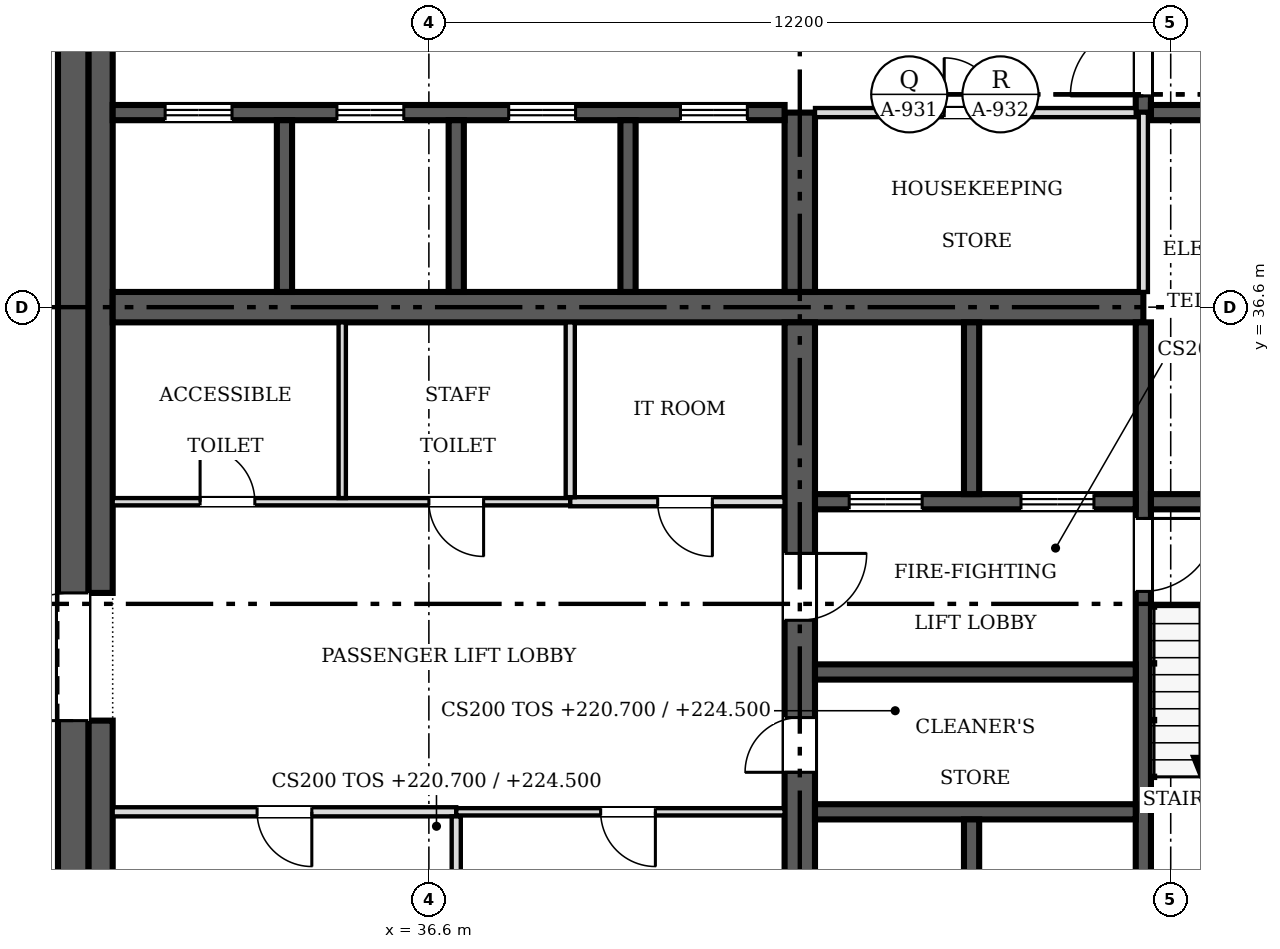
"""IFC4 building model, lengths in metres.
Left out: names, types, materials, properties, quantities, classifications, styles, units other than length and angle.
Written with IfcOpenShell. Run it as: python <this file> out.ifc"""

import sys

from ifc_helpers import new_model, si_unit, direction, frame, frame_2d, origin, place, context, subcontext, project, spatial, rectangle, extrude, source, transform, mapped, element, fill, save


model = new_model("IFC4")
c1 = context("Model", 3, precision=1e-05, world=origin(), true_north=direction((0.0, 1.0)))
c2 = subcontext(c1, "Body", "Model", "MODEL_VIEW")
j1 = project(units=[si_unit("LENGTHUNIT", "METRE"), si_unit("PLANEANGLEUNIT", "RADIAN")], contexts=[c1])
p1 = place(None, origin())
s1 = spatial("IfcSite", under=j1, at=p1, CompositionType="ELEMENT")
p2 = place(p1, origin())
s2 = spatial("IfcBuilding", under=s1, at=p2, CompositionType="ELEMENT")
p3 = place(p2, frame((0.0, 0.0, 220.7)))
s3 = spatial("IfcBuildingStorey", under=s2, at=p3, CompositionType="ELEMENT", Elevation=220.7)
p4 = place(p3, frame((30.75, 24.9, 0.0), z_axis=(0.0, 0.0, 1.0), x_axis=(0.0, 1.0, 0.0)))
e1 = element("IfcWall", 1, at=p4, inside=s3, PredefinedType="SHEAR", context=c2, shape_type="SweptSolid", body=[
    extrude(rectangle(XDim=23.4, YDim=0.5, at=frame_2d((11.7, 0.0))), origin(), (0.0, 0.0, 1.0), 3.8),
])
m1 = source(origin(), c2, "Body", "SweptSolid", [
    extrude(rectangle(XDim=2.1, YDim=2.4, at=frame_2d((1.05, 1.2))), frame((0.0, 0.26, 0.0), z_axis=(0.0, -1.0, 0.0), x_axis=(1.0, 0.0, 0.0)), (0.0, 0.0, 1.0), 0.52),
])
p5 = place(p4, frame((4.9, 0.0, 0.0)))
e2 = element("IfcOpeningElement", 2, at=p5, cuts=e1, PredefinedType="OPENING", context=c2, shape_type="MappedRepresentation", body=[
    mapped(m1, transform((0.0, 0.0, 0.0), scale=1.0)),
])
p6 = place(p4, frame((16.4, 0.0, 0.0)))
e3 = element("IfcOpeningElement", 3, at=p6, cuts=e1, PredefinedType="OPENING", context=c2, shape_type="MappedRepresentation", body=[
    mapped(m1, transform((0.0, 0.0, 0.0), scale=1.0)),
])
p7 = place(p3, frame((31.2, 25.3, 0.0), z_axis=(0.0, 0.0, 1.0), x_axis=(0.0, 1.0, 0.0)))
e4 = element("IfcWall", 4, at=p7, inside=s3, PredefinedType="SOLIDWALL", context=c2, shape_type="SweptSolid", body=[
    extrude(rectangle(XDim=4.5, YDim=0.4, at=frame_2d((2.25, 0.0))), origin(), (0.0, 0.0, 1.0), 3.8),
])
p8 = place(p3, frame((31.2, 31.9, 0.0), z_axis=(0.0, 0.0, 1.0), x_axis=(0.0, 1.0, 0.0)))
e5 = element("IfcWall", 5, at=p8, inside=s3, PredefinedType="SOLIDWALL", context=c2, shape_type="SweptSolid", body=[
    extrude(rectangle(XDim=9.4, YDim=0.4, at=frame_2d((4.7, 0.0))), origin(), (0.0, 0.0, 1.0), 3.8),
])
p9 = place(p3, frame((31.4, 36.6, 0.0), z_axis=(0.0, 0.0, 1.0), x_axis=(1.0, 0.0, 0.0)))
e6 = element("IfcWall", 6, at=p9, inside=s3, PredefinedType="SHEAR", context=c2, shape_type="SweptSolid", body=[
    extrude(rectangle(XDim=16.95, YDim=0.5, at=frame_2d((8.475, 0.0))), origin(), (0.0, 0.0, 1.0), 3.8),
])
p10 = place(p3, frame((42.7, 36.35, 0.0), z_axis=(0.0, 0.0, 1.0), x_axis=(0.0, -1.0, 0.0)))
e7 = element("IfcWall", 7, at=p10, inside=s3, PredefinedType="SHEAR", context=c2, shape_type="SweptSolid", body=[
    extrude(rectangle(XDim=11.05, YDim=0.5, at=frame_2d((5.525, 0.0))), origin(), (0.0, 0.0, 1.0), 3.8),
])
m2 = source(origin(), c2, "Body", "SweptSolid", [
    extrude(rectangle(XDim=0.9, YDim=2.1, at=frame_2d((0.45, 1.05))), frame((0.0, 0.26, 0.0), z_axis=(0.0, -1.0, 0.0), x_axis=(1.0, 0.0, 0.0)), (0.0, 0.0, 1.0), 0.52),
])
p11 = place(p10, frame((6.5, 0.0, 0.0)))
e8 = element("IfcOpeningElement", 8, at=p11, cuts=e7, PredefinedType="OPENING", context=c2, shape_type="MappedRepresentation", body=[
    mapped(m2, transform((0.0, 0.0, 0.0), scale=1.0)),
])
m3 = source(origin(), c2, "Body", "SweptSolid", [
    extrude(rectangle(XDim=1.1, YDim=2.1, at=frame_2d((0.55, 1.05))), frame((0.0, 0.26, 0.0), z_axis=(0.0, -1.0, 0.0), x_axis=(1.0, 0.0, 0.0)), (0.0, 0.0, 1.0), 0.52),
])
p12 = place(p10, frame((3.8, 0.0, 0.0)))
e9 = element("IfcOpeningElement", 9, at=p12, cuts=e7, PredefinedType="OPENING", context=c2, shape_type="MappedRepresentation", body=[
    mapped(m3, transform((0.0, 0.0, 0.0), scale=1.0)),
])
p13 = place(p3, frame((42.7, 36.85, 0.0), z_axis=(0.0, 0.0, 1.0), x_axis=(0.0, 1.0, 0.0)))
e10 = element("IfcWall", 10, at=p13, inside=s3, PredefinedType="SHEAR", context=c2, shape_type="SweptSolid", body=[
    extrude(rectangle(XDim=2.95, YDim=0.5, at=frame_2d((1.475, 0.0))), origin(), (0.0, 0.0, 1.0), 3.8),
])
p14 = place(p3, frame((31.4, 39.8, 0.0), z_axis=(0.0, 0.0, 1.0), x_axis=(1.0, 0.0, 0.0)))
e11 = element("IfcWall", 11, at=p14, inside=s3, PredefinedType="SOLIDWALL", context=c2, shape_type="SweptSolid", body=[
    extrude(rectangle(XDim=11.05, YDim=0.25, at=frame_2d((5.525, 0.0))), origin(), (0.0, 0.0, 1.0), 3.8),
])
m4 = source(origin(), c2, "Body", "SweptSolid", [
    extrude(rectangle(XDim=1.1, YDim=2.1, at=frame_2d((0.55, 1.05))), frame((0.0, 0.135, 0.0), z_axis=(0.0, -1.0, 0.0), x_axis=(1.0, 0.0, 0.0)), (0.0, 0.0, 1.0), 0.27),
])
p15 = place(p14, frame((0.863, 0.0, 0.0)))
e12 = element("IfcOpeningElement", 12, at=p15, cuts=e11, PredefinedType="OPENING", context=c2, shape_type="MappedRepresentation", body=[
    mapped(m4, transform((0.0, 0.0, 0.0), scale=1.0)),
])
p16 = place(p14, frame((3.688, 0.0, 0.0)))
e13 = element("IfcOpeningElement", 13, at=p16, cuts=e11, PredefinedType="OPENING", context=c2, shape_type="MappedRepresentation", body=[
    mapped(m4, transform((0.0, 0.0, 0.0), scale=1.0)),
])
p17 = place(p14, frame((6.512, 0.0, 0.0)))
e14 = element("IfcOpeningElement", 14, at=p17, cuts=e11, PredefinedType="OPENING", context=c2, shape_type="MappedRepresentation", body=[
    mapped(m4, transform((0.0, 0.0, 0.0), scale=1.0)),
])
p18 = place(p14, frame((9.337, 0.0, 0.0)))
e15 = element("IfcOpeningElement", 15, at=p18, cuts=e11, PredefinedType="OPENING", context=c2, shape_type="MappedRepresentation", body=[
    mapped(m4, transform((0.0, 0.0, 0.0), scale=1.0)),
])
p19 = place(p3, frame((48.35, 36.35, 0.0), z_axis=(0.0, 0.0, 1.0), x_axis=(0.0, -1.0, 0.0)))
e16 = element("IfcWall", 16, at=p19, inside=s3, PredefinedType="SOLIDWALL", context=c2, shape_type="SweptSolid", body=[
    extrude(rectangle(XDim=11.05, YDim=0.25, at=frame_2d((5.525, 0.0))), origin(), (0.0, 0.0, 1.0), 3.8),
])
m5 = source(origin(), c2, "Body", "SweptSolid", [
    extrude(rectangle(XDim=1.2, YDim=2.1, at=frame_2d((0.6, 1.05))), frame((0.0, 0.135, 0.0), z_axis=(0.0, -1.0, 0.0), x_axis=(1.0, 0.0, 0.0)), (0.0, 0.0, 1.0), 0.27),
])
p20 = place(p19, frame((3.225, 0.0, 0.0)))
e17 = element("IfcOpeningElement", 17, at=p20, cuts=e16, PredefinedType="OPENING", context=c2, shape_type="MappedRepresentation", body=[
    mapped(m5, transform((0.0, 0.0, 0.0), scale=1.0)),
])
p21 = place(p3, frame((48.225, 33.4, 0.0), z_axis=(0.0, 0.0, 1.0), x_axis=(-1.0, 0.0, 0.0)))
e18 = element("IfcWall", 18, at=p21, inside=s3, PredefinedType="SOLIDWALL", context=c2, shape_type="SweptSolid", body=[
    extrude(rectangle(XDim=5.275, YDim=0.25, at=frame_2d((2.638, 0.0))), origin(), (0.0, 0.0, 1.0), 3.8),
])
p22 = place(p21, frame((3.512, 0.0, 0.0)))
e19 = element("IfcOpeningElement", 19, at=p22, cuts=e18, PredefinedType="OPENING", context=c2, shape_type="MappedRepresentation", body=[
    mapped(m5, transform((0.0, 0.0, 0.0), scale=1.0)),
])
p23 = place(p21, frame((0.688, 0.0, 0.0)))
e20 = element("IfcOpeningElement", 20, at=p23, cuts=e18, PredefinedType="OPENING", context=c2, shape_type="MappedRepresentation", body=[
    mapped(m5, transform((0.0, 0.0, 0.0), scale=1.0)),
])
p24 = place(p3, frame((48.475, 33.4, 0.0), z_axis=(0.0, 0.0, 1.0), x_axis=(1.0, 0.0, 0.0)))
e21 = element("IfcWall", 21, at=p24, inside=s3, PredefinedType="SOLIDWALL", context=c2, shape_type="SweptSolid", body=[
    extrude(rectangle(XDim=3.525, YDim=0.25, at=frame_2d((1.762, 0.0))), origin(), (0.0, 0.0, 1.0), 3.8),
])
p25 = place(p3, frame((48.35, 47.9, 0.0), z_axis=(0.0, 0.0, 1.0), x_axis=(0.0, -1.0, 0.0)))
e22 = element("IfcWall", 22, at=p25, inside=s3, PredefinedType="SOLIDWALL", context=c2, shape_type="SweptSolid", body=[
    extrude(rectangle(XDim=8.1, YDim=0.25, at=frame_2d((4.05, 0.0))), origin(), (0.0, 0.0, 1.0), 3.8),
])
p26 = place(p25, frame((6.625, 0.0, 0.0)))
e23 = element("IfcOpeningElement", 23, at=p26, cuts=e22, PredefinedType="OPENING", context=c2, shape_type="MappedRepresentation", body=[
    mapped(m5, transform((0.0, 0.0, 0.0), scale=1.0)),
])
for number, where, z_axis, x_axis in (
    (24, (42.95, 28.3, 0.0), (0.0, 0.0, 1.0), (1.0, 0.0, 0.0)),
    (25, (42.95, 30.6, 0.0), (0.0, 0.0, 1.0), (1.0, 0.0, 0.0)),
):
    element("IfcWall", number, at=place(p3, frame(where, z_axis=z_axis, x_axis=x_axis)), inside=s3, PredefinedType="SOLIDWALL", context=c2, shape_type="SweptSolid", body=[
        extrude(rectangle(XDim=5.275, YDim=0.25, at=frame_2d((2.638, 0.0))), origin(), (0.0, 0.0, 1.0), 3.8),
    ])
p27 = place(p3, frame((48.475, 39.8, 0.0), z_axis=(0.0, 0.0, 1.0), x_axis=(1.0, 0.0, 0.0)))
e26 = element("IfcWall", 26, at=p27, inside=s3, PredefinedType="SOLIDWALL", context=c2, shape_type="SweptSolid", body=[
    extrude(rectangle(XDim=3.4, YDim=0.25, at=frame_2d((1.7, 0.0))), origin(), (0.0, 0.0, 1.0), 3.8),
])
for number, where, z_axis, x_axis in (
    (27, (34.225, 36.85, 0.0), (0.0, 0.0, 1.0), (0.0, 1.0, 0.0)),
    (28, (37.05, 36.85, 0.0), (0.0, 0.0, 1.0), (0.0, 1.0, 0.0)),
    (29, (39.875, 36.85, 0.0), (0.0, 0.0, 1.0), (0.0, 1.0, 0.0)),
):
    element("IfcWall", number, at=place(p3, frame(where, z_axis=z_axis, x_axis=x_axis)), inside=s3, PredefinedType="SOLIDWALL", context=c2, shape_type="SweptSolid", body=[
        extrude(rectangle(XDim=2.825, YDim=0.25, at=frame_2d((1.413, 0.0))), origin(), (0.0, 0.0, 1.0), 3.8),
    ])
p28 = place(p3, frame((45.525, 33.525, 0.0), z_axis=(0.0, 0.0, 1.0), x_axis=(0.0, 1.0, 0.0)))
e30 = element("IfcWall", 30, at=p28, inside=s3, PredefinedType="SOLIDWALL", context=c2, shape_type="SweptSolid", body=[
    extrude(rectangle(XDim=2.825, YDim=0.25, at=frame_2d((1.413, 0.0))), origin(), (0.0, 0.0, 1.0), 3.8),
])
p29 = place(p3, frame((45.525, 25.3, 0.0), z_axis=(0.0, 0.0, 1.0), x_axis=(0.0, 1.0, 0.0)))
e31 = element("IfcWall", 31, at=p29, inside=s3, PredefinedType="SOLIDWALL", context=c2, shape_type="SweptSolid", body=[
    extrude(rectangle(XDim=2.875, YDim=0.25, at=frame_2d((1.438, 0.0))), origin(), (0.0, 0.0, 1.0), 3.8),
])
p30 = place(p3, frame((31.4, 33.4, 0.0), z_axis=(0.0, 0.0, 1.0), x_axis=(1.0, 0.0, 0.0)))
e32 = element("IfcWall", 32, at=p30, inside=s3, PredefinedType="PARTITIONING", context=c2, shape_type="SweptSolid", body=[
    extrude(rectangle(XDim=7.525, YDim=0.12, at=frame_2d((3.763, 0.0))), origin(), (0.0, 0.0, 1.0), 3.6),
])
m6 = source(origin(), c2, "Body", "SweptSolid", [
    extrude(rectangle(XDim=0.9, YDim=2.1, at=frame_2d((0.45, 1.05))), frame((0.0, 0.07, 0.0), z_axis=(0.0, -1.0, 0.0), x_axis=(1.0, 0.0, 0.0)), (0.0, 0.0, 1.0), 0.14),
])
p31 = place(p30, frame((1.438, 0.0, 0.0)))
e33 = element("IfcOpeningElement", 33, at=p31, cuts=e32, PredefinedType="OPENING", context=c2, shape_type="MappedRepresentation", body=[
    mapped(m6, transform((0.0, 0.0, 0.0), scale=1.0)),
])
p32 = place(p30, frame((5.2, 0.0, 0.0)))
e34 = element("IfcOpeningElement", 34, at=p32, cuts=e32, PredefinedType="OPENING", context=c2, shape_type="MappedRepresentation", body=[
    mapped(m6, transform((0.0, 0.0, 0.0), scale=1.0)),
])
p33 = place(p3, frame((48.225, 39.8, 0.0), z_axis=(0.0, 0.0, 1.0), x_axis=(-1.0, 0.0, 0.0)))
e35 = element("IfcWall", 35, at=p33, inside=s3, PredefinedType="PARTITIONING", context=c2, shape_type="SweptSolid", body=[
    extrude(rectangle(XDim=5.275, YDim=0.15, at=frame_2d((2.638, 0.0))), origin(), (0.0, 0.0, 1.0), 3.6),
])
m7 = source(origin(), c2, "Body", "SweptSolid", [
    extrude(rectangle(XDim=0.9, YDim=2.1, at=frame_2d((0.45, 1.05))), frame((0.0, 0.085, 0.0), z_axis=(0.0, -1.0, 0.0), x_axis=(1.0, 0.0, 0.0)), (0.0, 0.0, 1.0), 0.17),
])
p34 = place(p33, frame((2.25, 0.0, 0.0)))
e36 = element("IfcOpeningElement", 36, at=p34, cuts=e35, PredefinedType="OPENING", context=c2, shape_type="MappedRepresentation", body=[
    mapped(m7, transform((0.0, 0.0, 0.0), scale=1.0)),
])
p35 = place(p3, frame((37.05, 28.3, 0.0), z_axis=(0.0, 0.0, 1.0), x_axis=(-1.0, 0.0, 0.0)))
e37 = element("IfcWall", 37, at=p35, inside=s3, PredefinedType="PARTITIONING", context=c2, shape_type="SweptSolid", body=[
    extrude(rectangle(XDim=5.65, YDim=0.15, at=frame_2d((2.825, 0.0))), origin(), (0.0, 0.0, 1.0), 3.6),
])
p36 = place(p35, frame((2.375, 0.0, 0.0)))
e38 = element("IfcOpeningElement", 38, at=p36, cuts=e37, PredefinedType="OPENING", context=c2, shape_type="MappedRepresentation", body=[
    mapped(m7, transform((0.0, 0.0, 0.0), scale=1.0)),
])
p37 = place(p3, frame((42.45, 28.3, 0.0), z_axis=(0.0, 0.0, 1.0), x_axis=(-1.0, 0.0, 0.0)))
e39 = element("IfcWall", 39, at=p37, inside=s3, PredefinedType="PARTITIONING", context=c2, shape_type="SweptSolid", body=[
    extrude(rectangle(XDim=5.4, YDim=0.12, at=frame_2d((2.7, 0.0))), origin(), (0.0, 0.0, 1.0), 3.6),
])
p38 = place(p37, frame((2.125, 0.0, 0.0)))
e40 = element("IfcOpeningElement", 40, at=p38, cuts=e39, PredefinedType="OPENING", context=c2, shape_type="MappedRepresentation", body=[
    mapped(m6, transform((0.0, 0.0, 0.0), scale=1.0)),
])
p39 = place(p3, frame((38.925, 33.4, 0.0), z_axis=(0.0, 0.0, 1.0), x_axis=(1.0, 0.0, 0.0)))
e41 = element("IfcWall", 41, at=p39, inside=s3, PredefinedType="PARTITIONING", context=c2, shape_type="SweptSolid", body=[
    extrude(rectangle(XDim=3.525, YDim=0.15, at=frame_2d((1.762, 0.0))), origin(), (0.0, 0.0, 1.0), 3.6),
])
p40 = place(p39, frame((1.438, 0.0, 0.0)))
e42 = element("IfcOpeningElement", 42, at=p40, cuts=e41, PredefinedType="OPENING", context=c2, shape_type="MappedRepresentation", body=[
    mapped(m7, transform((0.0, 0.0, 0.0), scale=1.0)),
])
p41 = place(p3, frame((48.35, 36.85, 0.0), z_axis=(0.0, 0.0, 1.0), x_axis=(0.0, 1.0, 0.0)))
e43 = element("IfcWall", 43, at=p41, inside=s3, PredefinedType="PARTITIONING", context=c2, shape_type="SweptSolid", body=[
    extrude(rectangle(XDim=2.95, YDim=0.15, at=frame_2d((1.475, 0.0))), origin(), (0.0, 0.0, 1.0), 3.6),
])
p42 = place(p3, frame((35.175, 33.46, 0.0), z_axis=(0.0, 0.0, 1.0), x_axis=(0.0, 1.0, 0.0)))
e44 = element("IfcWall", 44, at=p42, inside=s3, PredefinedType="PARTITIONING", context=c2, shape_type="SweptSolid", body=[
    extrude(rectangle(XDim=2.89, YDim=0.12, at=frame_2d((1.445, 0.0))), origin(), (0.0, 0.0, 1.0), 3.6),
])
p43 = place(p3, frame((38.925, 33.475, 0.0), z_axis=(0.0, 0.0, 1.0), x_axis=(0.0, 1.0, 0.0)))
e45 = element("IfcWall", 45, at=p43, inside=s3, PredefinedType="PARTITIONING", context=c2, shape_type="SweptSolid", body=[
    extrude(rectangle(XDim=2.875, YDim=0.15, at=frame_2d((1.438, 0.0))), origin(), (0.0, 0.0, 1.0), 3.6),
])
p44 = place(p3, frame((37.05, 25.3, 0.0), z_axis=(0.0, 0.0, 1.0), x_axis=(0.0, 1.0, 0.0)))
e46 = element("IfcWall", 46, at=p44, inside=s3, PredefinedType="PARTITIONING", context=c2, shape_type="SweptSolid", body=[
    extrude(rectangle(XDim=2.925, YDim=0.15, at=frame_2d((1.462, 0.0))), origin(), (0.0, 0.0, 1.0), 3.6),
])
m8 = source(origin(), c2, "Body", "SweptSolid", [
    extrude(rectangle(XDim=2.1, YDim=2.4, at=frame_2d((1.05, 1.2))), frame((0.0, 0.025, 0.0), z_axis=(0.0, -1.0, 0.0), x_axis=(1.0, 0.0, 0.0)), (0.0, 0.0, 1.0), 0.05),
])
p45 = place(p5, origin())
e47 = element("IfcDoor", 47, at=p45, inside=s3, OperationType="DOUBLE_DOOR_SINGLE_SWING", PredefinedType="DOOR", context=c2, shape_type="MappedRepresentation", body=[
    mapped(m8, transform((0.0, 0.0, 0.0), scale=1.0)),
])
fill(e2, e47)
m9 = source(origin(), c2, "Body", "SweptSolid", [
    extrude(rectangle(XDim=0.9, YDim=2.1, at=frame_2d((0.45, 1.05))), frame((0.0, 0.025, 0.0), z_axis=(0.0, -1.0, 0.0), x_axis=(1.0, 0.0, 0.0)), (0.0, 0.0, 1.0), 0.05),
])
p46 = place(p11, origin())
e48 = element("IfcDoor", 48, at=p46, inside=s3, OperationType="SINGLE_SWING_RIGHT", PredefinedType="DOOR", context=c2, shape_type="MappedRepresentation", body=[
    mapped(m9, transform((0.0, 0.0, 0.0), scale=1.0)),
])
fill(e8, e48)
m10 = source(origin(), c2, "Body", "SweptSolid", [
    extrude(rectangle(XDim=1.1, YDim=2.1, at=frame_2d((0.55, 1.05))), frame((0.0, 0.025, 0.0), z_axis=(0.0, -1.0, 0.0), x_axis=(1.0, 0.0, 0.0)), (0.0, 0.0, 1.0), 0.05),
])
p47 = place(p12, origin())
e49 = element("IfcDoor", 49, at=p47, inside=s3, OperationType="SINGLE_SWING_LEFT", PredefinedType="DOOR", context=c2, shape_type="MappedRepresentation", body=[
    mapped(m10, transform((0.0, 0.0, 0.0), scale=1.0)),
])
fill(e9, e49)
p48 = place(p15, origin())
e50 = element("IfcDoor", 50, at=p48, inside=s3, OperationType="DOUBLE_DOOR_SLIDING", PredefinedType="DOOR", context=c2, shape_type="MappedRepresentation", body=[
    mapped(m10, transform((0.0, 0.0, 0.0), scale=1.0)),
])
fill(e12, e50)
p49 = place(p16, origin())
e51 = element("IfcDoor", 51, at=p49, inside=s3, OperationType="DOUBLE_DOOR_SLIDING", PredefinedType="DOOR", context=c2, shape_type="MappedRepresentation", body=[
    mapped(m10, transform((0.0, 0.0, 0.0), scale=1.0)),
])
fill(e13, e51)
p50 = place(p17, origin())
e52 = element("IfcDoor", 52, at=p50, inside=s3, OperationType="DOUBLE_DOOR_SLIDING", PredefinedType="DOOR", context=c2, shape_type="MappedRepresentation", body=[
    mapped(m10, transform((0.0, 0.0, 0.0), scale=1.0)),
])
fill(e14, e52)
p51 = place(p18, origin())
e53 = element("IfcDoor", 53, at=p51, inside=s3, OperationType="DOUBLE_DOOR_SLIDING", PredefinedType="DOOR", context=c2, shape_type="MappedRepresentation", body=[
    mapped(m10, transform((0.0, 0.0, 0.0), scale=1.0)),
])
fill(e15, e53)
m11 = source(origin(), c2, "Body", "SweptSolid", [
    extrude(rectangle(XDim=1.2, YDim=2.1, at=frame_2d((0.6, 1.05))), frame((0.0, 0.025, 0.0), z_axis=(0.0, -1.0, 0.0), x_axis=(1.0, 0.0, 0.0)), (0.0, 0.0, 1.0), 0.05),
])
p52 = place(p20, origin())
e54 = element("IfcDoor", 54, at=p52, inside=s3, OperationType="SINGLE_SWING_LEFT", PredefinedType="DOOR", context=c2, shape_type="MappedRepresentation", body=[
    mapped(m11, transform((0.0, 0.0, 0.0), scale=1.0)),
])
fill(e17, e54)
p53 = place(p22, origin())
e55 = element("IfcDoor", 55, at=p53, inside=s3, OperationType="DOUBLE_DOOR_SLIDING", PredefinedType="DOOR", context=c2, shape_type="MappedRepresentation", body=[
    mapped(m11, transform((0.0, 0.0, 0.0), scale=1.0)),
])
fill(e19, e55)
p54 = place(p23, origin())
e56 = element("IfcDoor", 56, at=p54, inside=s3, OperationType="DOUBLE_DOOR_SLIDING", PredefinedType="DOOR", context=c2, shape_type="MappedRepresentation", body=[
    mapped(m11, transform((0.0, 0.0, 0.0), scale=1.0)),
])
fill(e20, e56)
p55 = place(p26, origin())
e57 = element("IfcDoor", 57, at=p55, inside=s3, OperationType="SINGLE_SWING_RIGHT", PredefinedType="DOOR", context=c2, shape_type="MappedRepresentation", body=[
    mapped(m11, transform((0.0, 0.0, 0.0), scale=1.0)),
])
fill(e23, e57)
p56 = place(p31, origin())
e58 = element("IfcDoor", 58, at=p56, inside=s3, OperationType="SINGLE_SWING_LEFT", PredefinedType="DOOR", context=c2, shape_type="MappedRepresentation", body=[
    mapped(m9, transform((0.0, 0.0, 0.0), scale=1.0)),
])
fill(e33, e58)
p57 = place(p32, origin())
e59 = element("IfcDoor", 59, at=p57, inside=s3, OperationType="SINGLE_SWING_RIGHT", PredefinedType="DOOR", context=c2, shape_type="MappedRepresentation", body=[
    mapped(m9, transform((0.0, 0.0, 0.0), scale=1.0)),
])
fill(e34, e59)
p58 = place(p34, origin())
e60 = element("IfcDoor", 60, at=p58, inside=s3, OperationType="SINGLE_SWING_RIGHT", PredefinedType="DOOR", context=c2, shape_type="MappedRepresentation", body=[
    mapped(m9, transform((0.0, 0.0, 0.0), scale=1.0)),
])
fill(e36, e60)
p59 = place(p36, origin())
e61 = element("IfcDoor", 61, at=p59, inside=s3, OperationType="SINGLE_SWING_LEFT", PredefinedType="DOOR", context=c2, shape_type="MappedRepresentation", body=[
    mapped(m9, transform((0.0, 0.0, 0.0), scale=1.0)),
])
fill(e38, e61)
p60 = place(p38, origin())
e62 = element("IfcDoor", 62, at=p60, inside=s3, OperationType="SINGLE_SWING_LEFT", PredefinedType="DOOR", context=c2, shape_type="MappedRepresentation", body=[
    mapped(m9, transform((0.0, 0.0, 0.0), scale=1.0)),
])
fill(e40, e62)
p61 = place(p40, origin())
e63 = element("IfcDoor", 63, at=p61, inside=s3, OperationType="SINGLE_SWING_RIGHT", PredefinedType="DOOR", context=c2, shape_type="MappedRepresentation", body=[
    mapped(m9, transform((0.0, 0.0, 0.0), scale=1.0)),
])
fill(e42, e63)
save(model, sys.argv[1])
